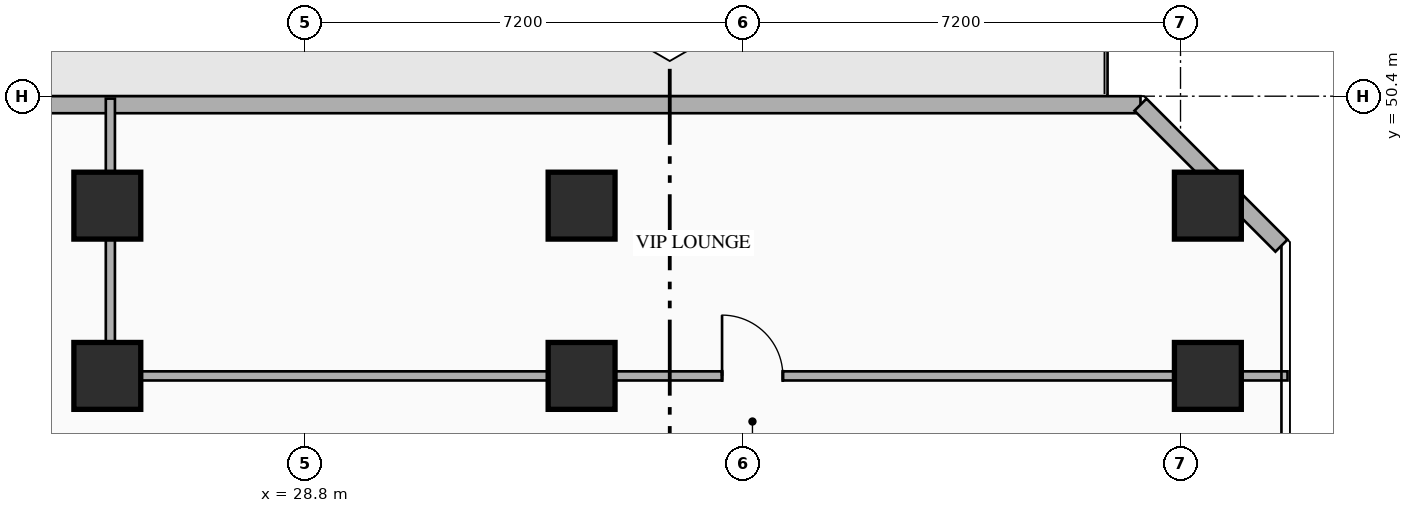
"""IFC4 building model, lengths in metres.
Left out: names, types, materials, properties, quantities, classifications, styles, units other than length and angle.
Written with IfcOpenShell. Run it as: python <this file> out.ifc"""

import sys

from ifc_helpers import new_model, si_unit, direction, frame, frame_2d, origin, origin_2d, place, context, subcontext, project, spatial, rectangle, hollow_rectangle, extrude, element, fill, save


model = new_model("IFC4")
c1 = context("Model", 3, precision=1e-05, world=origin(), true_north=direction((0.0, 1.0)))
c2 = subcontext(c1, "Body", "Model", "MODEL_VIEW")
j1 = project(units=[si_unit("LENGTHUNIT", "METRE"), si_unit("PLANEANGLEUNIT", "RADIAN")], contexts=[c1])
p1 = place(None, origin())
s1 = spatial("IfcSite", under=j1, at=p1, CompositionType="ELEMENT")
p2 = place(p1, origin())
s2 = spatial("IfcBuilding", under=s1, at=p2, CompositionType="ELEMENT")
p3 = place(p2, frame((0.0, 0.0, 32.1)))
s3 = spatial("IfcBuildingStorey", under=s2, at=p3, CompositionType="ELEMENT", Elevation=32.1)
for number, where, z_axis, x_axis in (
    (1, (25.55, 45.8, 0.0), (0.0, 0.0, 1.0), (1.0, 0.0, 0.0)),
    (2, (33.35, 45.8, 0.0), (0.0, 0.0, 1.0), (1.0, 0.0, 0.0)),
    (3, (43.65, 45.8, 0.0), (0.0, 0.0, 1.0), (1.0, 0.0, 0.0)),
    (4, (25.55, 48.6, 0.0), (0.0, 0.0, 1.0), (1.0, 0.0, 0.0)),
    (5, (33.35, 48.6, 0.0), (0.0, 0.0, 1.0), (1.0, 0.0, 0.0)),
    (6, (43.65, 48.6, 0.0), (0.0, 0.0, 1.0), (1.0, 0.0, 0.0)),
):
    element("IfcColumn", number, at=place(p3, frame(where, z_axis=z_axis, x_axis=x_axis)), inside=s3, PredefinedType="COLUMN", context=c2, shape_type="SweptSolid", body=[
        extrude(hollow_rectangle(XDim=1.1, YDim=1.1, WallThickness=0.04, at=origin_2d()), origin(), (0.0, 0.0, 1.0), 4.5),
    ])
p4 = place(p3, frame((2.458, 50.26, 0.0), z_axis=(0.0, 0.0, 1.0), x_axis=(1.0, 0.0, 0.0)))
e7 = element("IfcWall", 7, at=p4, inside=s3, PredefinedType="STANDARD", context=c2, shape_type="SweptSolid", body=[
    extrude(rectangle(XDim=40.084, YDim=0.28, at=frame_2d((20.042, 0.0))), origin(), (0.0, 0.0, 1.0), 4.28),
])
p5 = place(p4, frame((19.792, 0.0, 0.0)))
e8 = element("IfcOpeningElement", 8, at=p5, cuts=e7, PredefinedType="OPENING", context=c2, shape_type="SweptSolid", body=[
    extrude(rectangle(XDim=1.1, YDim=2.2, at=frame_2d((0.55, 1.1))), frame((0.0, 0.15, 0.0), z_axis=(0.0, -1.0, 0.0), x_axis=(1.0, 0.0, 0.0)), (0.0, 0.0, 1.0), 0.3),
])
p6 = place(p4, frame((4.11, 0.0, 0.85)))
e9 = element("IfcOpeningElement", 9, at=p6, cuts=e7, PredefinedType="OPENING", context=c2, shape_type="SweptSolid", body=[
    extrude(rectangle(XDim=1.4, YDim=1.8, at=frame_2d((0.7, 0.9))), frame((0.0, 0.15, 0.0), z_axis=(0.0, -1.0, 0.0), x_axis=(1.0, 0.0, 0.0)), (0.0, 0.0, 1.0), 0.3),
])
p7 = place(p3, frame((42.542, 50.26, 0.0), z_axis=(0.0, 0.0, 1.0), x_axis=(0.707106781187, -0.707106781187, 0.0)))
e10 = element("IfcWall", 10, at=p7, inside=s3, PredefinedType="STANDARD", context=c2, shape_type="SweptSolid", body=[
    extrude(rectangle(XDim=3.278, YDim=0.28, at=frame_2d((1.639, 0.0))), origin(), (0.0, 0.0, 1.0), 4.28),
])
p8 = place(p3, frame((25.6, 45.8, 0.0), z_axis=(0.0, 0.0, 1.0), x_axis=(1.0, 0.0, 0.0)))
e11 = element("IfcWall", 11, at=p8, inside=s3, PredefinedType="PARTITIONING", context=c2, shape_type="SweptSolid", body=[
    extrude(rectangle(XDim=19.36, YDim=0.15, at=frame_2d((9.68, 0.0))), origin(), (0.0, 0.0, 1.0), 3.475),
])
p9 = place(p8, frame((10.06, 0.0, 0.0)))
e12 = element("IfcOpeningElement", 12, at=p9, cuts=e11, PredefinedType="OPENING", context=c2, shape_type="SweptSolid", body=[
    extrude(rectangle(XDim=1.0, YDim=2.15, at=frame_2d((0.5, 1.075))), frame((0.0, 0.085, 0.0), z_axis=(0.0, -1.0, 0.0), x_axis=(1.0, 0.0, 0.0)), (0.0, 0.0, 1.0), 0.17),
])
p10 = place(p3, frame((25.6, 45.8, 0.0), z_axis=(0.0, 0.0, 1.0), x_axis=(0.0, 1.0, 0.0)))
e13 = element("IfcWall", 13, at=p10, inside=s3, PredefinedType="PARTITIONING", context=c2, shape_type="SweptSolid", body=[
    extrude(rectangle(XDim=4.56, YDim=0.15, at=frame_2d((2.28, 0.0))), origin(), (0.0, 0.0, 1.0), 3.475),
])
p11 = place(p9, origin())
e14 = element("IfcDoor", 14, at=p11, inside=s3, OperationType="SINGLE_SWING_LEFT", PredefinedType="DOOR", context=c2, shape_type="SweptSolid", body=[
    extrude(rectangle(XDim=1.0, YDim=2.15, at=frame_2d((0.5, 1.075))), frame((0.0, 0.025, 0.0), z_axis=(0.0, -1.0, 0.0), x_axis=(1.0, 0.0, 0.0)), (0.0, 0.0, 1.0), 0.05),
])
fill(e12, e14)
save(model, sys.argv[1])
